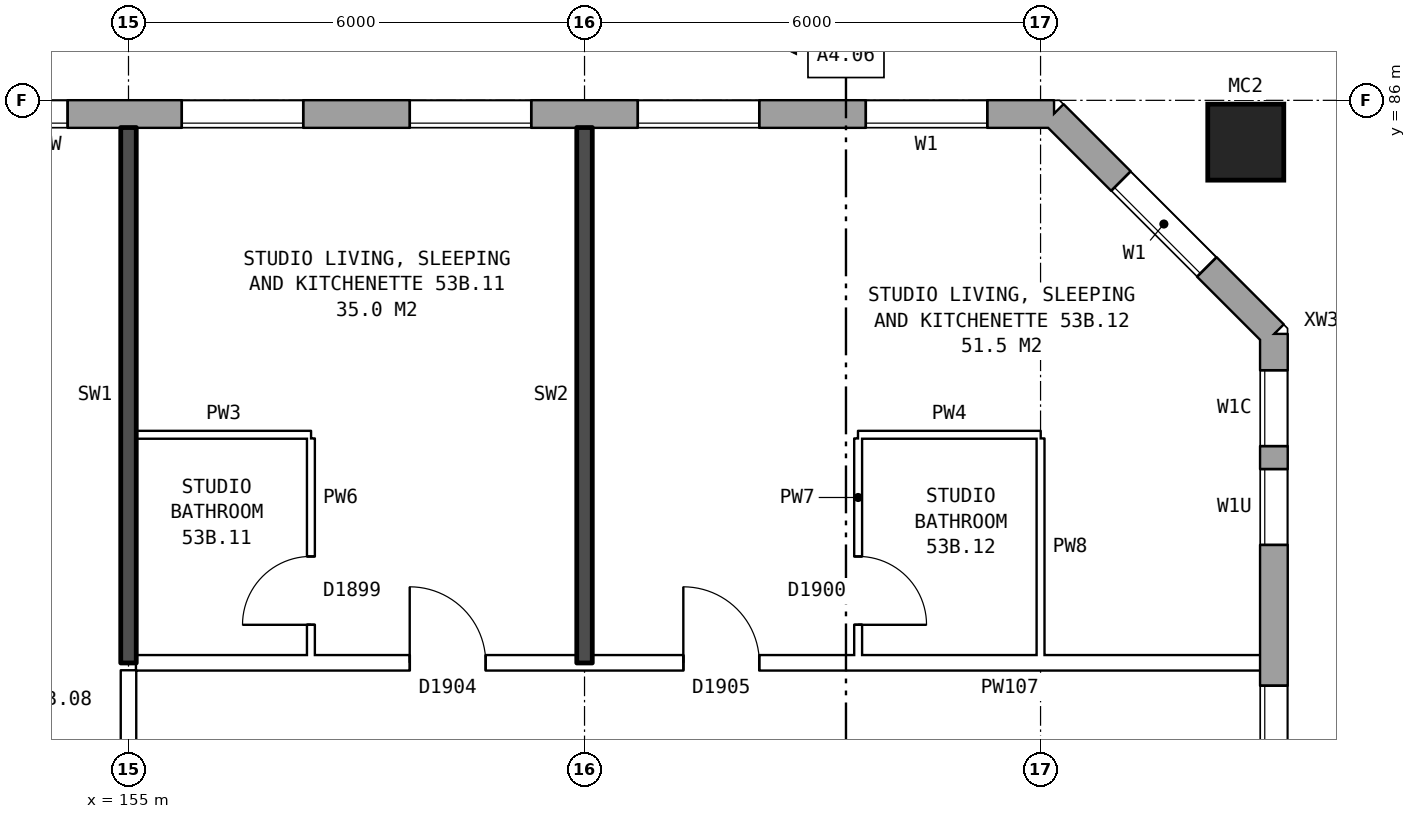
"""IFC4 building model, lengths in metres.
Left out: names, types, materials, properties, quantities, classifications, styles, units other than length and angle.
Written with IfcOpenShell. Run it as: python <this file> out.ifc"""

import sys

from ifc_helpers import new_model, si_unit, direction, frame, frame_2d, origin, origin_2d, place, context, subcontext, project, spatial, rectangle, hollow_rectangle, extrude, element, fill, save


model = new_model("IFC4")
c1 = context("Model", 3, precision=1e-05, world=origin(), true_north=direction((0.0, 1.0)))
c2 = subcontext(c1, "Body", "Model", "MODEL_VIEW")
j1 = project(units=[si_unit("LENGTHUNIT", "METRE"), si_unit("PLANEANGLEUNIT", "RADIAN")], contexts=[c1])
p1 = place(None, origin())
s1 = spatial("IfcSite", under=j1, at=p1, CompositionType="ELEMENT")
p2 = place(p1, origin())
s2 = spatial("IfcBuilding", under=s1, at=p2, CompositionType="ELEMENT")
p3 = place(p2, frame((0.0, 0.0, 188.2)))
s3 = spatial("IfcBuildingStorey", under=s2, at=p3, CompositionType="ELEMENT", Elevation=188.2)
p4 = place(p3, frame((169.7, 85.45, 0.0), z_axis=(0.0, 0.0, 1.0), x_axis=(1.0, 0.0, 0.0)))
e1 = element("IfcColumn", 1, at=p4, inside=s3, PredefinedType="COLUMN", context=c2, shape_type="SweptSolid", body=[
    extrude(hollow_rectangle(XDim=1.0, YDim=1.0, WallThickness=0.055, at=origin_2d()), origin(), (0.0, 0.0, 1.0), 3.1),
])
p5 = place(p3, frame((170.07, 57.075, 0.0), z_axis=(0.0, 0.0, 1.0), x_axis=(0.0, 1.0, 0.0)))
e2 = element("IfcWall", 2, at=p5, inside=s3, PredefinedType="STANDARD", context=c2, shape_type="SweptSolid", body=[
    extrude(rectangle(XDim=25.851, YDim=0.36, at=frame_2d((12.925, 0.0))), origin(), (0.0, 0.0, 1.0), 2.85),
])
p6 = place(p5, frame((0.3, 0.0, 0.8)))
e3 = element("IfcOpeningElement", 3, at=p6, cuts=e2, PredefinedType="OPENING", context=c2, shape_type="SweptSolid", body=[
    extrude(rectangle(XDim=1.2, YDim=1.8, at=frame_2d((0.6, 0.9))), frame((0.0, 0.19, 0.0), z_axis=(0.0, -1.0, 0.0), x_axis=(1.0, 0.0, 0.0)), (0.0, 0.0, 1.0), 0.38),
])
p7 = place(p5, frame((4.625, 0.0, 0.8)))
e4 = element("IfcOpeningElement", 4, at=p7, cuts=e2, PredefinedType="OPENING", context=c2, shape_type="SweptSolid", body=[
    extrude(rectangle(XDim=1.6, YDim=1.8, at=frame_2d((0.8, 0.9))), frame((0.0, 0.19, 0.0), z_axis=(0.0, -1.0, 0.0), x_axis=(1.0, 0.0, 0.0)), (0.0, 0.0, 1.0), 0.38),
])
p8 = place(p5, frame((7.625, 0.0, 0.8)))
e5 = element("IfcOpeningElement", 5, at=p8, cuts=e2, PredefinedType="OPENING", context=c2, shape_type="SweptSolid", body=[
    extrude(rectangle(XDim=1.6, YDim=1.8, at=frame_2d((0.8, 0.9))), frame((0.0, 0.19, 0.0), z_axis=(0.0, -1.0, 0.0), x_axis=(1.0, 0.0, 0.0)), (0.0, 0.0, 1.0), 0.38),
])
p9 = place(p5, frame((10.625, 0.0, 0.8)))
e6 = element("IfcOpeningElement", 6, at=p9, cuts=e2, PredefinedType="OPENING", context=c2, shape_type="SweptSolid", body=[
    extrude(rectangle(XDim=1.6, YDim=1.8, at=frame_2d((0.8, 0.9))), frame((0.0, 0.19, 0.0), z_axis=(0.0, -1.0, 0.0), x_axis=(1.0, 0.0, 0.0)), (0.0, 0.0, 1.0), 0.38),
])
p10 = place(p5, frame((13.625, 0.0, 0.8)))
e7 = element("IfcOpeningElement", 7, at=p10, cuts=e2, PredefinedType="OPENING", context=c2, shape_type="SweptSolid", body=[
    extrude(rectangle(XDim=1.6, YDim=1.8, at=frame_2d((0.8, 0.9))), frame((0.0, 0.19, 0.0), z_axis=(0.0, -1.0, 0.0), x_axis=(1.0, 0.0, 0.0)), (0.0, 0.0, 1.0), 0.38),
])
p11 = place(p5, frame((16.625, 0.0, 0.8)))
e8 = element("IfcOpeningElement", 8, at=p11, cuts=e2, PredefinedType="OPENING", context=c2, shape_type="SweptSolid", body=[
    extrude(rectangle(XDim=1.6, YDim=1.8, at=frame_2d((0.8, 0.9))), frame((0.0, 0.19, 0.0), z_axis=(0.0, -1.0, 0.0), x_axis=(1.0, 0.0, 0.0)), (0.0, 0.0, 1.0), 0.38),
])
p12 = place(p5, frame((19.625, 0.0, 0.8)))
e9 = element("IfcOpeningElement", 9, at=p12, cuts=e2, PredefinedType="OPENING", context=c2, shape_type="SweptSolid", body=[
    extrude(rectangle(XDim=1.6, YDim=1.8, at=frame_2d((0.8, 0.9))), frame((0.0, 0.19, 0.0), z_axis=(0.0, -1.0, 0.0), x_axis=(1.0, 0.0, 0.0)), (0.0, 0.0, 1.0), 0.38),
])
p13 = place(p5, frame((23.075, 0.0, 0.8)))
e10 = element("IfcOpeningElement", 10, at=p13, cuts=e2, PredefinedType="OPENING", context=c2, shape_type="SweptSolid", body=[
    extrude(rectangle(XDim=1.0, YDim=0.9, at=frame_2d((0.5, 0.45))), frame((0.0, 0.19, 0.0), z_axis=(0.0, -1.0, 0.0), x_axis=(1.0, 0.0, 0.0)), (0.0, 0.0, 1.0), 0.38),
])
p14 = place(p5, frame((1.8, 0.0, 0.8)))
e11 = element("IfcOpeningElement", 11, at=p14, cuts=e2, PredefinedType="OPENING", context=c2, shape_type="SweptSolid", body=[
    extrude(rectangle(XDim=0.8, YDim=0.9, at=frame_2d((0.4, 0.45))), frame((0.0, 0.19, 0.0), z_axis=(0.0, -1.0, 0.0), x_axis=(1.0, 0.0, 0.0)), (0.0, 0.0, 1.0), 0.38),
])
p15 = place(p5, frame((24.375, 0.0, 0.8)))
e12 = element("IfcOpeningElement", 12, at=p15, cuts=e2, PredefinedType="OPENING", context=c2, shape_type="SweptSolid", body=[
    extrude(rectangle(XDim=1.0, YDim=1.8, at=frame_2d((0.5, 0.9))), frame((0.0, 0.19, 0.0), z_axis=(0.0, -1.0, 0.0), x_axis=(1.0, 0.0, 0.0)), (0.0, 0.0, 1.0), 0.38),
])
p16 = place(p3, frame((170.07, 82.925, 0.0), z_axis=(0.0, 0.0, 1.0), x_axis=(-0.707106781187, 0.707106781187, 0.0)))
e13 = element("IfcWall", 13, at=p16, inside=s3, PredefinedType="STANDARD", context=c2, shape_type="SweptSolid", body=[
    extrude(rectangle(XDim=4.094, YDim=0.36, at=frame_2d((2.047, 0.0))), origin(), (0.0, 0.0, 1.0), 2.85),
])
p17 = place(p16, frame((1.247, 0.0, 0.8)))
e14 = element("IfcOpeningElement", 14, at=p17, cuts=e13, PredefinedType="OPENING", context=c2, shape_type="SweptSolid", body=[
    extrude(rectangle(XDim=1.6, YDim=1.8, at=frame_2d((0.8, 0.9))), frame((0.0, 0.19, 0.0), z_axis=(0.0, -1.0, 0.0), x_axis=(1.0, 0.0, 0.0)), (0.0, 0.0, 1.0), 0.38),
])
p18 = place(p3, frame((167.175, 85.82, 0.0), z_axis=(0.0, 0.0, 1.0), x_axis=(-1.0, 0.0, 0.0)))
e15 = element("IfcWall", 15, at=p18, inside=s3, PredefinedType="STANDARD", context=c2, shape_type="SweptSolid", body=[
    extrude(rectangle(XDim=33.101, YDim=0.36, at=frame_2d((16.55, 0.0))), origin(), (0.0, 0.0, 1.0), 2.85),
])
p19 = place(p18, frame((0.875, 0.0, 0.8)))
e16 = element("IfcOpeningElement", 16, at=p19, cuts=e15, PredefinedType="OPENING", context=c2, shape_type="SweptSolid", body=[
    extrude(rectangle(XDim=1.6, YDim=1.8, at=frame_2d((0.8, 0.9))), frame((0.0, 0.19, 0.0), z_axis=(0.0, -1.0, 0.0), x_axis=(1.0, 0.0, 0.0)), (0.0, 0.0, 1.0), 0.38),
])
p20 = place(p18, frame((3.875, 0.0, 0.8)))
e17 = element("IfcOpeningElement", 17, at=p20, cuts=e15, PredefinedType="OPENING", context=c2, shape_type="SweptSolid", body=[
    extrude(rectangle(XDim=1.6, YDim=1.8, at=frame_2d((0.8, 0.9))), frame((0.0, 0.19, 0.0), z_axis=(0.0, -1.0, 0.0), x_axis=(1.0, 0.0, 0.0)), (0.0, 0.0, 1.0), 0.38),
])
p21 = place(p18, frame((6.875, 0.0, 0.8)))
e18 = element("IfcOpeningElement", 18, at=p21, cuts=e15, PredefinedType="OPENING", context=c2, shape_type="SweptSolid", body=[
    extrude(rectangle(XDim=1.6, YDim=1.8, at=frame_2d((0.8, 0.9))), frame((0.0, 0.19, 0.0), z_axis=(0.0, -1.0, 0.0), x_axis=(1.0, 0.0, 0.0)), (0.0, 0.0, 1.0), 0.38),
])
p22 = place(p18, frame((9.875, 0.0, 0.8)))
e19 = element("IfcOpeningElement", 19, at=p22, cuts=e15, PredefinedType="OPENING", context=c2, shape_type="SweptSolid", body=[
    extrude(rectangle(XDim=1.6, YDim=1.8, at=frame_2d((0.8, 0.9))), frame((0.0, 0.19, 0.0), z_axis=(0.0, -1.0, 0.0), x_axis=(1.0, 0.0, 0.0)), (0.0, 0.0, 1.0), 0.38),
])
p23 = place(p18, frame((12.975, 0.0, 0.15)))
e20 = element("IfcOpeningElement", 20, at=p23, cuts=e15, PredefinedType="OPENING", context=c2, shape_type="SweptSolid", body=[
    extrude(rectangle(XDim=0.6, YDim=0.9, at=frame_2d((0.3, 0.45))), frame((0.0, 0.19, 0.0), z_axis=(0.0, -1.0, 0.0), x_axis=(1.0, 0.0, 0.0)), (0.0, 0.0, 1.0), 0.38),
])
p24 = place(p18, frame((15.875, 0.0, 0.8)))
e21 = element("IfcOpeningElement", 21, at=p24, cuts=e15, PredefinedType="OPENING", context=c2, shape_type="SweptSolid", body=[
    extrude(rectangle(XDim=1.6, YDim=1.8, at=frame_2d((0.8, 0.9))), frame((0.0, 0.19, 0.0), z_axis=(0.0, -1.0, 0.0), x_axis=(1.0, 0.0, 0.0)), (0.0, 0.0, 1.0), 0.38),
])
p25 = place(p18, frame((18.375, 0.0, 0.35)))
e22 = element("IfcOpeningElement", 22, at=p25, cuts=e15, PredefinedType="OPENING", context=c2, shape_type="SweptSolid", body=[
    extrude(rectangle(XDim=0.8, YDim=1.8, at=frame_2d((0.4, 0.9))), frame((0.0, 0.19, 0.0), z_axis=(0.0, -1.0, 0.0), x_axis=(1.0, 0.0, 0.0)), (0.0, 0.0, 1.0), 0.38),
])
p26 = place(p18, frame((21.875, 0.0, 0.8)))
e23 = element("IfcOpeningElement", 23, at=p26, cuts=e15, PredefinedType="OPENING", context=c2, shape_type="SweptSolid", body=[
    extrude(rectangle(XDim=1.6, YDim=1.8, at=frame_2d((0.8, 0.9))), frame((0.0, 0.19, 0.0), z_axis=(0.0, -1.0, 0.0), x_axis=(1.0, 0.0, 0.0)), (0.0, 0.0, 1.0), 0.38),
])
p27 = place(p18, frame((24.875, 0.0, 0.8)))
e24 = element("IfcOpeningElement", 24, at=p27, cuts=e15, PredefinedType="OPENING", context=c2, shape_type="SweptSolid", body=[
    extrude(rectangle(XDim=1.6, YDim=1.8, at=frame_2d((0.8, 0.9))), frame((0.0, 0.19, 0.0), z_axis=(0.0, -1.0, 0.0), x_axis=(1.0, 0.0, 0.0)), (0.0, 0.0, 1.0), 0.38),
])
p28 = place(p18, frame((27.875, 0.0, 0.8)))
e25 = element("IfcOpeningElement", 25, at=p28, cuts=e15, PredefinedType="OPENING", context=c2, shape_type="SweptSolid", body=[
    extrude(rectangle(XDim=1.6, YDim=1.8, at=frame_2d((0.8, 0.9))), frame((0.0, 0.19, 0.0), z_axis=(0.0, -1.0, 0.0), x_axis=(1.0, 0.0, 0.0)), (0.0, 0.0, 1.0), 0.38),
])
p29 = place(p18, frame((30.875, 0.0, 0.8)))
e26 = element("IfcOpeningElement", 26, at=p29, cuts=e15, PredefinedType="OPENING", context=c2, shape_type="SweptSolid", body=[
    extrude(rectangle(XDim=1.6, YDim=1.8, at=frame_2d((0.8, 0.9))), frame((0.0, 0.19, 0.0), z_axis=(0.0, -1.0, 0.0), x_axis=(1.0, 0.0, 0.0)), (0.0, 0.0, 1.0), 0.38),
])
p30 = place(p18, frame((13.875, 0.0, 0.25)))
e27 = element("IfcOpeningElement", 27, at=p30, cuts=e15, PredefinedType="OPENING", context=c2, shape_type="SweptSolid", body=[
    extrude(rectangle(XDim=1.0, YDim=1.8, at=frame_2d((0.5, 0.9))), frame((0.0, 0.19, 0.0), z_axis=(0.0, -1.0, 0.0), x_axis=(1.0, 0.0, 0.0)), (0.0, 0.0, 1.0), 0.38),
])
p31 = place(p18, frame((19.475, 0.0, 0.15)))
e28 = element("IfcOpeningElement", 28, at=p31, cuts=e15, PredefinedType="OPENING", context=c2, shape_type="SweptSolid", body=[
    extrude(rectangle(XDim=0.6, YDim=0.9, at=frame_2d((0.3, 0.45))), frame((0.0, 0.19, 0.0), z_axis=(0.0, -1.0, 0.0), x_axis=(1.0, 0.0, 0.0)), (0.0, 0.0, 1.0), 0.38),
])
p32 = place(p3, frame((155.1, 78.6, 0.0), z_axis=(0.0, 0.0, 1.0), x_axis=(1.0, 0.0, 0.0)))
e29 = element("IfcWall", 29, at=p32, inside=s3, PredefinedType="PARTITIONING", context=c2, shape_type="SweptSolid", body=[
    extrude(rectangle(XDim=14.79, YDim=0.2, at=frame_2d((7.395, 0.0))), origin(), (0.0, 0.0, 1.0), 2.85),
])
p33 = place(p32, frame((3.6, 0.0, 0.0)))
e30 = element("IfcOpeningElement", 30, at=p33, cuts=e29, PredefinedType="OPENING", context=c2, shape_type="SweptSolid", body=[
    extrude(rectangle(XDim=1.0, YDim=2.1, at=frame_2d((0.5, 1.05))), frame((0.0, 0.11, 0.0), z_axis=(0.0, -1.0, 0.0), x_axis=(1.0, 0.0, 0.0)), (0.0, 0.0, 1.0), 0.22),
])
p34 = place(p32, frame((7.2, 0.0, 0.0)))
e31 = element("IfcOpeningElement", 31, at=p34, cuts=e29, PredefinedType="OPENING", context=c2, shape_type="SweptSolid", body=[
    extrude(rectangle(XDim=1.0, YDim=2.1, at=frame_2d((0.5, 1.05))), frame((0.0, 0.11, 0.0), z_axis=(0.0, -1.0, 0.0), x_axis=(1.0, 0.0, 0.0)), (0.0, 0.0, 1.0), 0.22),
])
p35 = place(p3, frame((155.1, 81.6, 0.0), z_axis=(0.0, 0.0, 1.0), x_axis=(1.0, 0.0, 0.0)))
e32 = element("IfcWall", 32, at=p35, inside=s3, PredefinedType="PARTITIONING", context=c2, shape_type="SweptSolid", body=[
    extrude(rectangle(XDim=2.3, YDim=0.1, at=frame_2d((1.15, 0.0))), origin(), (0.0, 0.0, 1.0), 2.85),
])
p36 = place(p3, frame((164.6, 81.6, 0.0), z_axis=(0.0, 0.0, 1.0), x_axis=(1.0, 0.0, 0.0)))
e33 = element("IfcWall", 33, at=p36, inside=s3, PredefinedType="PARTITIONING", context=c2, shape_type="SweptSolid", body=[
    extrude(rectangle(XDim=2.4, YDim=0.1, at=frame_2d((1.2, 0.0))), origin(), (0.0, 0.0, 1.0), 2.85),
])
p37 = place(p3, frame((155.0, 76.3, 0.0), z_axis=(0.0, 0.0, 1.0), x_axis=(0.0, 1.0, 0.0)))
e34 = element("IfcWall", 34, at=p37, inside=s3, PredefinedType="PARTITIONING", context=c2, shape_type="SweptSolid", body=[
    extrude(rectangle(XDim=2.2, YDim=0.2, at=frame_2d((1.1, 0.0))), origin(), (0.0, 0.0, 1.0), 2.85),
])
p38 = place(p3, frame((155.0, 78.6, 0.0), z_axis=(0.0, 0.0, 1.0), x_axis=(0.0, 1.0, 0.0)))
e35 = element("IfcWall", 35, at=p38, inside=s3, PredefinedType="SOLIDWALL", context=c2, shape_type="SweptSolid", body=[
    extrude(rectangle(XDim=7.04, YDim=0.2, at=frame_2d((3.52, 0.0))), origin(), (0.0, 0.0, 1.0), 2.85),
])
p39 = place(p3, frame((157.4, 78.7, 0.0), z_axis=(0.0, 0.0, 1.0), x_axis=(0.0, 1.0, 0.0)))
e36 = element("IfcWall", 36, at=p39, inside=s3, PredefinedType="PARTITIONING", context=c2, shape_type="SweptSolid", body=[
    extrude(rectangle(XDim=2.85, YDim=0.1, at=frame_2d((1.425, 0.0))), origin(), (0.0, 0.0, 1.0), 2.85),
])
p40 = place(p39, frame((0.4, 0.0, 0.0)))
e37 = element("IfcOpeningElement", 37, at=p40, cuts=e36, PredefinedType="OPENING", context=c2, shape_type="SweptSolid", body=[
    extrude(rectangle(XDim=0.9, YDim=2.1, at=frame_2d((0.45, 1.05))), frame((0.0, 0.06, 0.0), z_axis=(0.0, -1.0, 0.0), x_axis=(1.0, 0.0, 0.0)), (0.0, 0.0, 1.0), 0.12),
])
p41 = place(p3, frame((161.0, 78.6, 0.0), z_axis=(0.0, 0.0, 1.0), x_axis=(0.0, 1.0, 0.0)))
e38 = element("IfcWall", 38, at=p41, inside=s3, PredefinedType="SOLIDWALL", context=c2, shape_type="SweptSolid", body=[
    extrude(rectangle(XDim=7.04, YDim=0.2, at=frame_2d((3.52, 0.0))), origin(), (0.0, 0.0, 1.0), 2.85),
])
p42 = place(p3, frame((164.6, 78.7, 0.0), z_axis=(0.0, 0.0, 1.0), x_axis=(0.0, 1.0, 0.0)))
e39 = element("IfcWall", 39, at=p42, inside=s3, PredefinedType="PARTITIONING", context=c2, shape_type="SweptSolid", body=[
    extrude(rectangle(XDim=2.85, YDim=0.1, at=frame_2d((1.425, 0.0))), origin(), (0.0, 0.0, 1.0), 2.85),
])
p43 = place(p42, frame((0.4, 0.0, 0.0)))
e40 = element("IfcOpeningElement", 40, at=p43, cuts=e39, PredefinedType="OPENING", context=c2, shape_type="SweptSolid", body=[
    extrude(rectangle(XDim=0.9, YDim=2.1, at=frame_2d((0.45, 1.05))), frame((0.0, 0.06, 0.0), z_axis=(0.0, -1.0, 0.0), x_axis=(1.0, 0.0, 0.0)), (0.0, 0.0, 1.0), 0.12),
])
p44 = place(p3, frame((167.0, 78.7, 0.0), z_axis=(0.0, 0.0, 1.0), x_axis=(0.0, 1.0, 0.0)))
e41 = element("IfcWall", 41, at=p44, inside=s3, PredefinedType="PARTITIONING", context=c2, shape_type="SweptSolid", body=[
    extrude(rectangle(XDim=2.85, YDim=0.1, at=frame_2d((1.425, 0.0))), origin(), (0.0, 0.0, 1.0), 2.85),
])
p45 = place(p12, origin())
e42 = element("IfcWindow", 42, at=p45, inside=s3, PartitioningType="SINGLE_PANEL", PredefinedType="WINDOW", context=c2, shape_type="SweptSolid", body=[
    extrude(rectangle(XDim=1.6, YDim=1.8, at=frame_2d((0.8, 0.9))), frame((0.0, 0.15, 0.0), z_axis=(0.0, -1.0, 0.0), x_axis=(1.0, 0.0, 0.0)), (0.0, 0.0, 1.0), 0.06),
])
fill(e9, e42)
p46 = place(p13, origin())
e43 = element("IfcWindow", 43, at=p46, inside=s3, PartitioningType="SINGLE_PANEL", PredefinedType="WINDOW", context=c2, shape_type="SweptSolid", body=[
    extrude(rectangle(XDim=1.0, YDim=0.9, at=frame_2d((0.5, 0.45))), frame((0.0, 0.15, 0.0), z_axis=(0.0, -1.0, 0.0), x_axis=(1.0, 0.0, 0.0)), (0.0, 0.0, 1.0), 0.06),
])
fill(e10, e43)
p47 = place(p17, origin())
e44 = element("IfcWindow", 44, at=p47, inside=s3, PartitioningType="SINGLE_PANEL", PredefinedType="WINDOW", context=c2, shape_type="SweptSolid", body=[
    extrude(rectangle(XDim=1.6, YDim=1.8, at=frame_2d((0.8, 0.9))), frame((0.0, 0.15, 0.0), z_axis=(0.0, -1.0, 0.0), x_axis=(1.0, 0.0, 0.0)), (0.0, 0.0, 1.0), 0.06),
])
fill(e14, e44)
p48 = place(p19, origin())
e45 = element("IfcWindow", 45, at=p48, inside=s3, PartitioningType="SINGLE_PANEL", PredefinedType="WINDOW", context=c2, shape_type="SweptSolid", body=[
    extrude(rectangle(XDim=1.6, YDim=1.8, at=frame_2d((0.8, 0.9))), frame((0.0, 0.15, 0.0), z_axis=(0.0, -1.0, 0.0), x_axis=(1.0, 0.0, 0.0)), (0.0, 0.0, 1.0), 0.06),
])
fill(e16, e45)
p49 = place(p20, origin())
e46 = element("IfcWindow", 46, at=p49, inside=s3, PartitioningType="SINGLE_PANEL", PredefinedType="WINDOW", context=c2, shape_type="SweptSolid", body=[
    extrude(rectangle(XDim=1.6, YDim=1.8, at=frame_2d((0.8, 0.9))), frame((0.0, 0.15, 0.0), z_axis=(0.0, -1.0, 0.0), x_axis=(1.0, 0.0, 0.0)), (0.0, 0.0, 1.0), 0.06),
])
fill(e17, e46)
p50 = place(p21, origin())
e47 = element("IfcWindow", 47, at=p50, inside=s3, PartitioningType="SINGLE_PANEL", PredefinedType="WINDOW", context=c2, shape_type="SweptSolid", body=[
    extrude(rectangle(XDim=1.6, YDim=1.8, at=frame_2d((0.8, 0.9))), frame((0.0, 0.15, 0.0), z_axis=(0.0, -1.0, 0.0), x_axis=(1.0, 0.0, 0.0)), (0.0, 0.0, 1.0), 0.06),
])
fill(e18, e47)
p51 = place(p22, origin())
e48 = element("IfcWindow", 48, at=p51, inside=s3, PartitioningType="SINGLE_PANEL", PredefinedType="WINDOW", context=c2, shape_type="SweptSolid", body=[
    extrude(rectangle(XDim=1.6, YDim=1.8, at=frame_2d((0.8, 0.9))), frame((0.0, 0.15, 0.0), z_axis=(0.0, -1.0, 0.0), x_axis=(1.0, 0.0, 0.0)), (0.0, 0.0, 1.0), 0.06),
])
fill(e19, e48)
p52 = place(p23, origin())
e49 = element("IfcWindow", 49, at=p52, inside=s3, PartitioningType="SINGLE_PANEL", PredefinedType="WINDOW", context=c2, shape_type="SweptSolid", body=[
    extrude(rectangle(XDim=0.6, YDim=0.9, at=frame_2d((0.3, 0.45))), frame((0.0, 0.15, 0.0), z_axis=(0.0, -1.0, 0.0), x_axis=(1.0, 0.0, 0.0)), (0.0, 0.0, 1.0), 0.06),
])
fill(e20, e49)
p53 = place(p33, origin())
e50 = element("IfcDoor", 50, at=p53, inside=s3, OperationType="SINGLE_SWING_LEFT", PredefinedType="DOOR", context=c2, shape_type="SweptSolid", body=[
    extrude(rectangle(XDim=1.0, YDim=2.1, at=frame_2d((0.5, 1.05))), frame((0.0, 0.025, 0.0), z_axis=(0.0, -1.0, 0.0), x_axis=(1.0, 0.0, 0.0)), (0.0, 0.0, 1.0), 0.05),
])
fill(e30, e50)
p54 = place(p40, origin())
e51 = element("IfcDoor", 51, at=p54, inside=s3, OperationType="SINGLE_SWING_LEFT", PredefinedType="DOOR", context=c2, shape_type="SweptSolid", body=[
    extrude(rectangle(XDim=0.9, YDim=2.1, at=frame_2d((0.45, 1.05))), frame((0.0, 0.025, 0.0), z_axis=(0.0, -1.0, 0.0), x_axis=(1.0, 0.0, 0.0)), (0.0, 0.0, 1.0), 0.05),
])
fill(e37, e51)
p55 = place(p34, origin())
e52 = element("IfcDoor", 52, at=p55, inside=s3, OperationType="SINGLE_SWING_LEFT", PredefinedType="DOOR", context=c2, shape_type="SweptSolid", body=[
    extrude(rectangle(XDim=1.0, YDim=2.1, at=frame_2d((0.5, 1.05))), frame((0.0, 0.025, 0.0), z_axis=(0.0, -1.0, 0.0), x_axis=(1.0, 0.0, 0.0)), (0.0, 0.0, 1.0), 0.05),
])
fill(e31, e52)
p56 = place(p43, frame((0.9, 0.0, 0.0), z_axis=(0.0, 0.0, 1.0), x_axis=(-1.0, 0.0, 0.0)))
e53 = element("IfcDoor", 53, at=p56, inside=s3, OperationType="SINGLE_SWING_RIGHT", PredefinedType="DOOR", context=c2, shape_type="SweptSolid", body=[
    extrude(rectangle(XDim=0.9, YDim=2.1, at=frame_2d((0.45, 1.05))), frame((0.0, 0.025, 0.0), z_axis=(0.0, -1.0, 0.0), x_axis=(1.0, 0.0, 0.0)), (0.0, 0.0, 1.0), 0.05),
])
fill(e40, e53)
p57 = place(p15, origin())
e54 = element("IfcWindow", 54, at=p57, inside=s3, PartitioningType="SINGLE_PANEL", PredefinedType="WINDOW", context=c2, shape_type="SweptSolid", body=[
    extrude(rectangle(XDim=1.0, YDim=1.8, at=frame_2d((0.5, 0.9))), frame((0.0, 0.15, 0.0), z_axis=(0.0, -1.0, 0.0), x_axis=(1.0, 0.0, 0.0)), (0.0, 0.0, 1.0), 0.06),
])
fill(e12, e54)
save(model, sys.argv[1])
